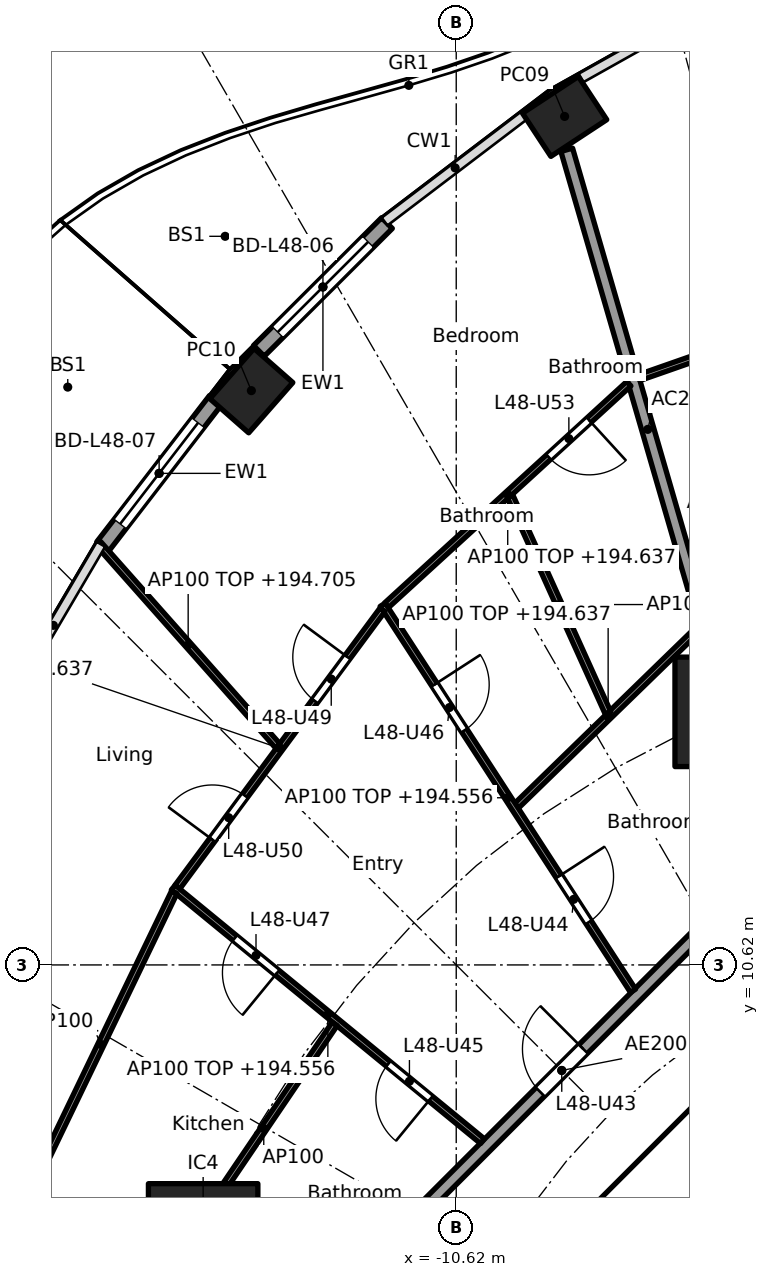
"""IFC4 building model, lengths in metres.
Left out: names, types, materials, properties, quantities, classifications, styles, units other than length and angle.
Written with IfcOpenShell. Run it as: python <this file> out.ifc"""

import sys

from ifc_helpers import new_model, si_unit, direction, frame, frame_2d, origin, origin_2d, place, context, subcontext, project, spatial, rectangle, hollow_rectangle, extrude, element, fill, save


model = new_model("IFC4")
c1 = context("Model", 3, precision=1e-05, world=origin(), true_north=direction((0.0, 1.0)))
c2 = subcontext(c1, "Body", "Model", "MODEL_VIEW")
j1 = project(units=[si_unit("LENGTHUNIT", "METRE"), si_unit("PLANEANGLEUNIT", "RADIAN")], contexts=[c1])
p1 = place(None, origin())
s1 = spatial("IfcSite", under=j1, at=p1, CompositionType="ELEMENT")
p2 = place(p1, origin())
s2 = spatial("IfcBuilding", under=s1, at=p2, CompositionType="ELEMENT")
p3 = place(p2, frame((0.0, 0.0, 191.8)))
s3 = spatial("IfcBuildingStorey", under=s2, at=p3, CompositionType="ELEMENT", Elevation=191.8)
for number, where, z_axis, x_axis in (
    (1, (-8.837, 24.573, 0.0), (0.0, 0.0, 1.0), (-0.836, -0.549, 0.0)),
    (2, (-13.989, 20.064, 0.0), (0.0, 0.0, 1.0), (-0.66, -0.751, 0.0)),
):
    element("IfcColumn", number, at=place(p3, frame(where, z_axis=z_axis, x_axis=x_axis)), inside=s3, PredefinedType="COLUMN", context=c2, shape_type="SweptSolid", body=[
        extrude(hollow_rectangle(XDim=1.1, YDim=0.85, WallThickness=0.036, at=origin_2d()), origin(), (0.0, 0.0, 1.0), 3.7),
    ])
for number, where, z_axis, x_axis in (
    (3, (-6.123, 14.782, 0.0), (0.0, 0.0, 1.0), (1.0, 0.0, 0.0)),
    (4, (-14.782, 6.123, 0.0), (0.0, 0.0, 1.0), (1.0, 0.0, 0.0)),
):
    element("IfcColumn", number, at=place(p3, frame(where, z_axis=z_axis, x_axis=x_axis)), inside=s3, PredefinedType="COLUMN", context=c2, shape_type="SweptSolid", body=[
        extrude(rectangle(XDim=1.8, YDim=1.8, at=origin_2d()), origin(), (0.0, 0.0, 1.0), 3.7),
    ])
p4 = place(p3, frame((-13.865, 20.718, 0.0), z_axis=(0.0, 0.0, 1.0), x_axis=(0.707844845069, 0.706367946122, 0.0)))
e5 = element("IfcWall", 5, at=p4, inside=s3, PredefinedType="SOLIDWALL", context=c2, shape_type="SweptSolid", body=[
    extrude(rectangle(XDim=2.976, YDim=0.25, at=frame_2d((1.488, 0.0))), origin(), (0.0, 0.0, 1.0), 3.44),
])
p5 = place(p4, frame((0.438, 0.0, 0.0)))
e6 = element("IfcOpeningElement", 6, at=p5, cuts=e5, PredefinedType="OPENING", context=c2, shape_type="SweptSolid", body=[
    extrude(rectangle(XDim=2.1, YDim=2.4, at=frame_2d((1.05, 1.2))), frame((0.0, 0.135, 0.0), z_axis=(0.0, -1.0, 0.0), x_axis=(1.0, 0.0, 0.0)), (0.0, 0.0, 1.0), 0.27),
])
p6 = place(p3, frame((-16.432, 17.502, 0.0), z_axis=(0.0, 0.0, 1.0), x_axis=(0.610437428894, 0.79206448311, 0.0)))
e7 = element("IfcWall", 7, at=p6, inside=s3, PredefinedType="SOLIDWALL", context=c2, shape_type="SweptSolid", body=[
    extrude(rectangle(XDim=3.035, YDim=0.25, at=frame_2d((1.518, 0.0))), origin(), (0.0, 0.0, 1.0), 3.44),
])
p7 = place(p6, frame((0.468, 0.0, 0.0)))
e8 = element("IfcOpeningElement", 8, at=p7, cuts=e7, PredefinedType="OPENING", context=c2, shape_type="SweptSolid", body=[
    extrude(rectangle(XDim=2.1, YDim=2.4, at=frame_2d((1.05, 1.2))), frame((0.0, 0.135, 0.0), z_axis=(0.0, -1.0, 0.0), x_axis=(1.0, 0.0, 0.0)), (0.0, 0.0, 1.0), 0.27),
])
p8 = place(p3, frame((-4.613, 9.988, 0.0), z_axis=(0.0, 0.0, 1.0), x_axis=(-0.707106781187, -0.707106781187, 0.0)))
e9 = element("IfcWall", 9, at=p8, inside=s3, PredefinedType="SHEAR", context=c2, shape_type="SweptSolid", body=[
    extrude(rectangle(XDim=7.602, YDim=0.6, at=frame_2d((3.801, 0.0))), origin(), (0.0, 0.0, 1.0), 3.44),
])
p9 = place(p8, frame((0.351, 0.0, 0.0)))
e10 = element("IfcOpeningElement", 10, at=p9, cuts=e9, PredefinedType="OPENING", context=c2, shape_type="SweptSolid", body=[
    extrude(rectangle(XDim=1.1, YDim=2.1, at=frame_2d((0.55, 1.05))), frame((0.0, 0.31, 0.0), z_axis=(0.0, -1.0, 0.0), x_axis=(1.0, 0.0, 0.0)), (0.0, 0.0, 1.0), 0.62),
])
p10 = place(p3, frame((-6.137, 14.83, 0.0), z_axis=(0.0, 0.0, 1.0), x_axis=(-0.278461169897, 0.96044748782, 0.0)))
e11 = element("IfcWall", 11, at=p10, inside=s3, PredefinedType="PARTITIONING", context=c2, shape_type="SweptSolid", body=[
    extrude(rectangle(XDim=9.573, YDim=0.2, at=frame_2d((4.787, 0.0))), origin(), (0.0, 0.0, 1.0), 2.837),
])
p11 = place(p3, frame((-5.275, 12.494, 0.0), z_axis=(0.0, 0.0, 1.0), x_axis=(-0.707106781187, -0.707106781187, 0.0)))
e12 = element("IfcWall", 12, at=p11, inside=s3, PredefinedType="PARTITIONING", context=c2, shape_type="SweptSolid", body=[
    extrude(rectangle(XDim=10.209, YDim=0.2, at=frame_2d((5.104, 0.0))), origin(), (0.0, 0.0, 1.0), 3.44),
])
p12 = place(p11, frame((4.604, 0.0, 0.0)))
e13 = element("IfcOpeningElement", 13, at=p12, cuts=e12, PredefinedType="OPENING", context=c2, shape_type="SweptSolid", body=[
    extrude(rectangle(XDim=1.0, YDim=2.1, at=frame_2d((0.5, 1.05))), frame((0.0, 0.11, 0.0), z_axis=(0.0, -1.0, 0.0), x_axis=(1.0, 0.0, 0.0)), (0.0, 0.0, 1.0), 0.22),
])
p13 = place(p3, frame((-2.546, 22.051, 0.0), z_axis=(0.0, 0.0, 1.0), x_axis=(-0.94391294884, -0.330194404878, 0.0)))
e14 = element("IfcWall", 14, at=p13, inside=s3, PredefinedType="PARTITIONING", context=c2, shape_type="SweptSolid", body=[
    extrude(rectangle(XDim=5.367, YDim=0.1, at=frame_2d((2.684, 0.0))), origin(), (0.0, 0.0, 1.0), 2.837),
])
p14 = place(p13, frame((2.234, 0.0, 0.0)))
e15 = element("IfcOpeningElement", 15, at=p14, cuts=e14, PredefinedType="OPENING", context=c2, shape_type="SweptSolid", body=[
    extrude(rectangle(XDim=0.9, YDim=2.1, at=frame_2d((0.45, 1.05))), frame((0.0, 0.06, 0.0), z_axis=(0.0, -1.0, 0.0), x_axis=(1.0, 0.0, 0.0)), (0.0, 0.0, 1.0), 0.12),
])
p15 = place(p3, frame((-6.616, 16.166, 0.0), z_axis=(0.0, 0.0, 1.0), x_axis=(-0.716919058692, -0.697156412352, 0.0)))
e16 = element("IfcWall", 16, at=p15, inside=s3, PredefinedType="PARTITIONING", context=c2, shape_type="SweptSolid", body=[
    extrude(rectangle(XDim=4.2, YDim=0.1, at=frame_2d((2.1, 0.0))), origin(), (0.0, 0.0, 1.0), 2.837),
])
p16 = place(p3, frame((-7.781, 20.178, 0.0), z_axis=(0.0, 0.0, 1.0), x_axis=(-0.73807320557, -0.674720640872, 0.0)))
e17 = element("IfcWall", 17, at=p16, inside=s3, PredefinedType="PARTITIONING", context=c2, shape_type="SweptSolid", body=[
    extrude(rectangle(XDim=5.399, YDim=0.1, at=frame_2d((2.699, 0.0))), origin(), (0.0, 0.0, 1.0), 2.837),
])
p17 = place(p16, frame((0.887, 0.0, 0.0)))
e18 = element("IfcOpeningElement", 18, at=p17, cuts=e17, PredefinedType="OPENING", context=c2, shape_type="SweptSolid", body=[
    extrude(rectangle(XDim=0.9, YDim=2.1, at=frame_2d((0.45, 1.05))), frame((0.0, 0.06, 0.0), z_axis=(0.0, -1.0, 0.0), x_axis=(1.0, 0.0, 0.0)), (0.0, 0.0, 1.0), 0.12),
])
p18 = place(p3, frame((-8.125, 14.765, 0.0), z_axis=(0.0, 0.0, 1.0), x_axis=(-0.411745679848, 0.911298795745, 0.0)))
e19 = element("IfcWall", 19, at=p18, inside=s3, PredefinedType="PARTITIONING", context=c2, shape_type="SweptSolid", body=[
    extrude(rectangle(XDim=3.909, YDim=0.1, at=frame_2d((1.955, 0.0))), origin(), (0.0, 0.0, 1.0), 3.44),
])
p19 = place(p3, frame((-7.712, 10.195, 0.0), z_axis=(0.0, 0.0, 1.0), x_axis=(-0.544179442551, 0.838968851809, 0.0)))
e20 = element("IfcWall", 20, at=p19, inside=s3, PredefinedType="PARTITIONING", context=c2, shape_type="SweptSolid", body=[
    extrude(rectangle(XDim=7.566, YDim=0.1, at=frame_2d((3.783, 0.0))), origin(), (0.0, 0.0, 1.0), 2.756),
])
p20 = place(p19, frame((1.343, 0.0, 0.0)))
e21 = element("IfcOpeningElement", 21, at=p20, cuts=e20, PredefinedType="OPENING", context=c2, shape_type="SweptSolid", body=[
    extrude(rectangle(XDim=0.9, YDim=2.1, at=frame_2d((0.45, 1.05))), frame((0.0, 0.06, 0.0), z_axis=(0.0, -1.0, 0.0), x_axis=(1.0, 0.0, 0.0)), (0.0, 0.0, 1.0), 0.12),
])
p21 = place(p19, frame((5.101, 0.0, 0.0)))
e22 = element("IfcOpeningElement", 22, at=p21, cuts=e20, PredefinedType="OPENING", context=c2, shape_type="SweptSolid", body=[
    extrude(rectangle(XDim=0.9, YDim=2.1, at=frame_2d((0.45, 1.05))), frame((0.0, 0.06, 0.0), z_axis=(0.0, -1.0, 0.0), x_axis=(1.0, 0.0, 0.0)), (0.0, 0.0, 1.0), 0.12),
])
p22 = place(p3, frame((-11.832, 16.461, 0.0), z_axis=(0.0, 0.0, 1.0), x_axis=(-0.594704483906, -0.803944386647, 0.0)))
e23 = element("IfcWall", 23, at=p22, inside=s3, PredefinedType="PARTITIONING", context=c2, shape_type="SweptSolid", body=[
    extrude(rectangle(XDim=5.672, YDim=0.1, at=frame_2d((2.836, 0.0))), origin(), (0.0, 0.0, 1.0), 2.837),
])
p23 = place(p22, frame((0.968, 0.0, 0.0)))
e24 = element("IfcOpeningElement", 24, at=p23, cuts=e23, PredefinedType="OPENING", context=c2, shape_type="SweptSolid", body=[
    extrude(rectangle(XDim=0.9, YDim=2.1, at=frame_2d((0.45, 1.05))), frame((0.0, 0.06, 0.0), z_axis=(0.0, -1.0, 0.0), x_axis=(1.0, 0.0, 0.0)), (0.0, 0.0, 1.0), 0.12),
])
p24 = place(p22, frame((3.804, 0.0, 0.0)))
e25 = element("IfcOpeningElement", 25, at=p24, cuts=e23, PredefinedType="OPENING", context=c2, shape_type="SweptSolid", body=[
    extrude(rectangle(XDim=0.9, YDim=2.1, at=frame_2d((0.45, 1.05))), frame((0.0, 0.06, 0.0), z_axis=(0.0, -1.0, 0.0), x_axis=(1.0, 0.0, 0.0)), (0.0, 0.0, 1.0), 0.12),
])
p25 = place(p3, frame((-13.552, 14.219, 0.0), z_axis=(0.0, 0.0, 1.0), x_axis=(-0.663542794709, 0.748138329181, 0.0)))
e26 = element("IfcWall", 26, at=p25, inside=s3, PredefinedType="PARTITIONING", context=c2, shape_type="SweptSolid", body=[
    extrude(rectangle(XDim=4.45, YDim=0.1, at=frame_2d((2.225, 0.0))), origin(), (0.0, 0.0, 1.0), 2.905),
])
p26 = place(p3, frame((-10.189, 7.721, 0.0), z_axis=(0.0, 0.0, 1.0), x_axis=(-0.773121441079, 0.634258021112, 0.0)))
e27 = element("IfcWall", 27, at=p26, inside=s3, PredefinedType="PARTITIONING", context=c2, shape_type="SweptSolid", body=[
    extrude(rectangle(XDim=6.577, YDim=0.1, at=frame_2d((3.289, 0.0))), origin(), (0.0, 0.0, 1.0), 2.756),
])
p27 = place(p26, frame((1.104, 0.0, 0.0)))
e28 = element("IfcOpeningElement", 28, at=p27, cuts=e27, PredefinedType="OPENING", context=c2, shape_type="SweptSolid", body=[
    extrude(rectangle(XDim=0.9, YDim=2.1, at=frame_2d((0.45, 1.05))), frame((0.0, 0.06, 0.0), z_axis=(0.0, -1.0, 0.0), x_axis=(1.0, 0.0, 0.0)), (0.0, 0.0, 1.0), 0.12),
])
p28 = place(p26, frame((4.367, 0.0, 0.0)))
e29 = element("IfcOpeningElement", 29, at=p28, cuts=e27, PredefinedType="OPENING", context=c2, shape_type="SweptSolid", body=[
    extrude(rectangle(XDim=0.9, YDim=2.1, at=frame_2d((0.45, 1.05))), frame((0.0, 0.06, 0.0), z_axis=(0.0, -1.0, 0.0), x_axis=(1.0, 0.0, 0.0)), (0.0, 0.0, 1.0), 0.12),
])
p29 = place(p3, frame((-12.619, 9.65, 0.0), z_axis=(0.0, 0.0, 1.0), x_axis=(-0.561064907171, -0.827771810308, 0.0)))
e30 = element("IfcWall", 30, at=p29, inside=s3, PredefinedType="PARTITIONING", context=c2, shape_type="SweptSolid", body=[
    extrude(rectangle(XDim=4.159, YDim=0.1, at=frame_2d((2.079, 0.0))), origin(), (0.0, 0.0, 1.0), 3.44),
])
p30 = place(p3, frame((-15.257, 11.816, 0.0), z_axis=(0.0, 0.0, 1.0), x_axis=(-0.434040130629, -0.900893536997, 0.0)))
e31 = element("IfcWall", 31, at=p30, inside=s3, PredefinedType="PARTITIONING", context=c2, shape_type="SweptSolid", body=[
    extrude(rectangle(XDim=5.558, YDim=0.1, at=frame_2d((2.779, 0.0))), origin(), (0.0, 0.0, 1.0), 3.44),
])
p31 = place(p5, origin())
e32 = element("IfcDoor", 32, at=p31, inside=s3, OperationType="SLIDING_TO_LEFT", PredefinedType="DOOR", context=c2, shape_type="SweptSolid", body=[
    extrude(rectangle(XDim=2.1, YDim=2.4, at=frame_2d((1.05, 1.2))), frame((0.0, 0.025, 0.0), z_axis=(0.0, -1.0, 0.0), x_axis=(1.0, 0.0, 0.0)), (0.0, 0.0, 1.0), 0.05),
])
fill(e6, e32)
p32 = place(p7, origin())
e33 = element("IfcDoor", 33, at=p32, inside=s3, OperationType="SLIDING_TO_LEFT", PredefinedType="DOOR", context=c2, shape_type="SweptSolid", body=[
    extrude(rectangle(XDim=2.1, YDim=2.4, at=frame_2d((1.05, 1.2))), frame((0.0, 0.025, 0.0), z_axis=(0.0, -1.0, 0.0), x_axis=(1.0, 0.0, 0.0)), (0.0, 0.0, 1.0), 0.05),
])
fill(e8, e33)
p33 = place(p12, frame((1.0, 0.0, 0.0), x_axis=(-1.0, 0.0, 0.0)))
e34 = element("IfcDoor", 34, at=p33, inside=s3, OperationType="SINGLE_SWING_RIGHT", PredefinedType="DOOR", context=c2, shape_type="SweptSolid", body=[
    extrude(rectangle(XDim=1.0, YDim=2.1, at=frame_2d((0.5, 1.05))), frame((0.0, 0.025, 0.0), z_axis=(0.0, -1.0, 0.0), x_axis=(1.0, 0.0, 0.0)), (0.0, 0.0, 1.0), 0.05),
])
fill(e13, e34)
p34 = place(p20, frame((0.9, 0.0, 0.0), x_axis=(-1.0, 0.0, 0.0)))
e35 = element("IfcDoor", 35, at=p34, inside=s3, OperationType="SINGLE_SWING_LEFT", PredefinedType="DOOR", context=c2, shape_type="SweptSolid", body=[
    extrude(rectangle(XDim=0.9, YDim=2.1, at=frame_2d((0.45, 1.05))), frame((0.0, 0.025, 0.0), z_axis=(0.0, -1.0, 0.0), x_axis=(1.0, 0.0, 0.0)), (0.0, 0.0, 1.0), 0.05),
])
fill(e21, e35)
p35 = place(p27, origin())
e36 = element("IfcDoor", 36, at=p35, inside=s3, OperationType="SINGLE_SWING_LEFT", PredefinedType="DOOR", context=c2, shape_type="SweptSolid", body=[
    extrude(rectangle(XDim=0.9, YDim=2.1, at=frame_2d((0.45, 1.05))), frame((0.0, 0.025, 0.0), z_axis=(0.0, -1.0, 0.0), x_axis=(1.0, 0.0, 0.0)), (0.0, 0.0, 1.0), 0.05),
])
fill(e28, e36)
p36 = place(p21, frame((0.9, 0.0, 0.0), x_axis=(-1.0, 0.0, 0.0)))
e37 = element("IfcDoor", 37, at=p36, inside=s3, OperationType="SINGLE_SWING_LEFT", PredefinedType="DOOR", context=c2, shape_type="SweptSolid", body=[
    extrude(rectangle(XDim=0.9, YDim=2.1, at=frame_2d((0.45, 1.05))), frame((0.0, 0.025, 0.0), z_axis=(0.0, -1.0, 0.0), x_axis=(1.0, 0.0, 0.0)), (0.0, 0.0, 1.0), 0.05),
])
fill(e22, e37)
p37 = place(p28, origin())
e38 = element("IfcDoor", 38, at=p37, inside=s3, OperationType="SINGLE_SWING_LEFT", PredefinedType="DOOR", context=c2, shape_type="SweptSolid", body=[
    extrude(rectangle(XDim=0.9, YDim=2.1, at=frame_2d((0.45, 1.05))), frame((0.0, 0.025, 0.0), z_axis=(0.0, -1.0, 0.0), x_axis=(1.0, 0.0, 0.0)), (0.0, 0.0, 1.0), 0.05),
])
fill(e29, e38)
p38 = place(p23, frame((0.9, 0.0, 0.0), x_axis=(-1.0, 0.0, 0.0)))
e39 = element("IfcDoor", 39, at=p38, inside=s3, OperationType="SINGLE_SWING_RIGHT", PredefinedType="DOOR", context=c2, shape_type="SweptSolid", body=[
    extrude(rectangle(XDim=0.9, YDim=2.1, at=frame_2d((0.45, 1.05))), frame((0.0, 0.025, 0.0), z_axis=(0.0, -1.0, 0.0), x_axis=(1.0, 0.0, 0.0)), (0.0, 0.0, 1.0), 0.05),
])
fill(e24, e39)
p39 = place(p24, frame((0.9, 0.0, 0.0), x_axis=(-1.0, 0.0, 0.0)))
e40 = element("IfcDoor", 40, at=p39, inside=s3, OperationType="SINGLE_SWING_LEFT", PredefinedType="DOOR", context=c2, shape_type="SweptSolid", body=[
    extrude(rectangle(XDim=0.9, YDim=2.1, at=frame_2d((0.45, 1.05))), frame((0.0, 0.025, 0.0), z_axis=(0.0, -1.0, 0.0), x_axis=(1.0, 0.0, 0.0)), (0.0, 0.0, 1.0), 0.05),
])
fill(e25, e40)
p40 = place(p17, origin())
e41 = element("IfcDoor", 41, at=p40, inside=s3, OperationType="SINGLE_SWING_LEFT", PredefinedType="DOOR", context=c2, shape_type="SweptSolid", body=[
    extrude(rectangle(XDim=0.9, YDim=2.1, at=frame_2d((0.45, 1.05))), frame((0.0, 0.025, 0.0), z_axis=(0.0, -1.0, 0.0), x_axis=(1.0, 0.0, 0.0)), (0.0, 0.0, 1.0), 0.05),
])
fill(e18, e41)
save(model, sys.argv[1])
